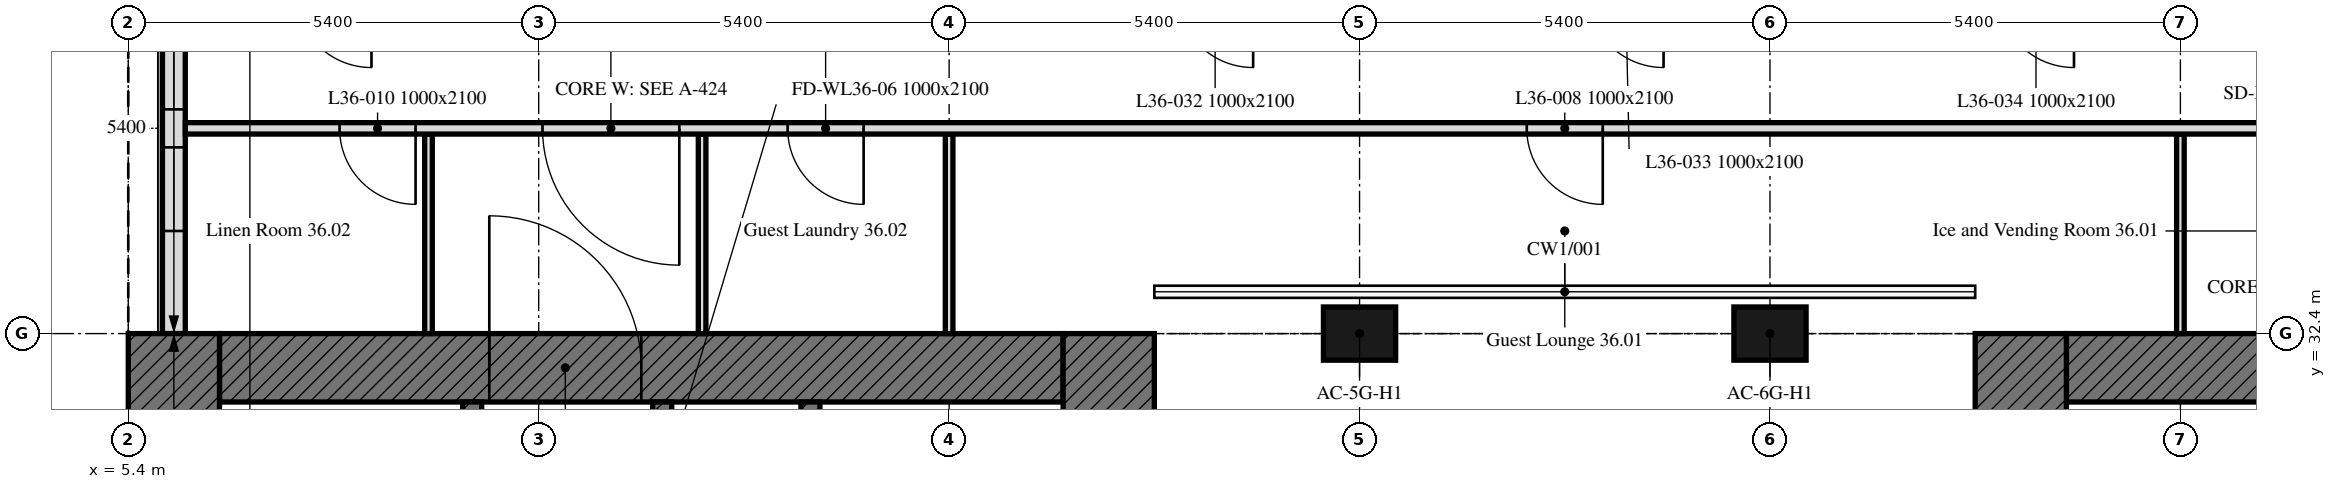
"""IFC4 building model, lengths in metres.
Left out: names, types, materials, properties, quantities, classifications, styles, units other than length and angle.
Written with IfcOpenShell. Run it as: python <this file> out.ifc"""

import sys

from ifc_helpers import new_model, si_unit, direction, frame, frame_2d, origin, origin_2d, place, context, subcontext, project, spatial, rectangle, extrude, element, fill, save


model = new_model("IFC4")
c1 = context("Model", 3, precision=1e-05, world=origin(), true_north=direction((0.0, 1.0)))
c2 = subcontext(c1, "Body", "Model", "MODEL_VIEW")
j1 = project(units=[si_unit("LENGTHUNIT", "METRE"), si_unit("PLANEANGLEUNIT", "RADIAN")], contexts=[c1])
p1 = place(None, origin())
s1 = spatial("IfcSite", under=j1, at=p1, CompositionType="ELEMENT")
p2 = place(p1, origin())
s2 = spatial("IfcBuilding", under=s1, at=p2, CompositionType="ELEMENT")
p3 = place(p2, frame((0.0, 0.0, 156.1)))
s3 = spatial("IfcBuildingStorey", under=s2, at=p3, CompositionType="ELEMENT", Elevation=156.1)
for number, where, z_axis, x_axis in (
    (1, (21.6, 32.4, 0.0), (0.0, 0.0, 1.0), (1.0, 0.0, 0.0)),
    (2, (27.0, 32.4, 0.0), (0.0, 0.0, 1.0), (1.0, 0.0, 0.0)),
):
    element("IfcColumn", number, at=place(p3, frame(where, z_axis=z_axis, x_axis=x_axis)), inside=s3, PredefinedType="COLUMN", context=c2, shape_type="SweptSolid", body=[
        extrude(rectangle(XDim=0.95, YDim=0.7, at=origin_2d()), origin(), (0.0, 0.0, 1.0), 3.0),
    ])
p4 = place(p3, frame((6.0, 37.614, 0.0), z_axis=(0.0, 0.0, 1.0), x_axis=(0.0, -1.0, 0.0)))
e3 = element("IfcWall", 3, at=p4, inside=s3, PredefinedType="SOLIDWALL", context=c2, shape_type="SweptSolid", body=[
    extrude(rectangle(XDim=5.214, YDim=0.3, at=frame_2d((2.607, 0.0))), origin(), (0.0, 0.0, 1.0), 3.0),
])
p5 = place(p4, frame((1.164, 0.0, 0.9)))
e4 = element("IfcOpeningElement", 4, at=p5, cuts=e3, PredefinedType="OPENING", context=c2, shape_type="SweptSolid", body=[
    extrude(rectangle(XDim=1.1, YDim=1.7, at=frame_2d((0.55, 0.85))), frame((0.0, 0.16, 0.0), z_axis=(0.0, -1.0, 0.0), x_axis=(1.0, 0.0, 0.0)), (0.0, 0.0, 1.0), 0.32),
])
p6 = place(p4, frame((2.764, 0.0, 0.9)))
e5 = element("IfcOpeningElement", 5, at=p6, cuts=e3, PredefinedType="OPENING", context=c2, shape_type="SweptSolid", body=[
    extrude(rectangle(XDim=1.1, YDim=1.7, at=frame_2d((0.55, 0.85))), frame((0.0, 0.16, 0.0), z_axis=(0.0, -1.0, 0.0), x_axis=(1.0, 0.0, 0.0)), (0.0, 0.0, 1.0), 0.32),
])
p7 = place(p3, frame((6.6, 31.95, 0.0), z_axis=(0.0, 0.0, 1.0), x_axis=(1.0, 0.0, 0.0)))
e6 = element("IfcWall", 6, at=p7, inside=s3, PredefinedType="SOLIDWALL", context=c2, shape_type="SweptSolid", body=[
    extrude(rectangle(XDim=11.1, YDim=0.9, at=frame_2d((5.55, 0.0))), origin(), (0.0, 0.0, 1.0), 3.0),
])
p8 = place(p7, frame((3.55, 0.0, 0.0)))
e7 = element("IfcOpeningElement", 7, at=p8, cuts=e6, PredefinedType="OPENING", context=c2, shape_type="SweptSolid", body=[
    extrude(rectangle(XDim=2.0, YDim=2.4, at=frame_2d((1.0, 1.2))), frame((0.0, 0.45, 0.0), z_axis=(0.0, -1.0, 0.0), x_axis=(1.0, 0.0, 0.0)), (0.0, 0.0, 1.0), 0.9),
])
for number, where, z_axis, x_axis in (
    (8, (6.0, 16.2, 0.0), (0.0, 0.0, 1.0), (0.0, 1.0, 0.0)),
    (9, (18.3, 32.4, 0.0), (0.0, 0.0, 1.0), (0.0, -1.0, 0.0)),
):
    element("IfcWall", number, at=place(p3, frame(where, z_axis=z_axis, x_axis=x_axis)), inside=s3, PredefinedType="SOLIDWALL", context=c2, shape_type="SweptSolid", body=[
        extrude(rectangle(XDim=16.2, YDim=1.2, at=frame_2d((8.1, 0.0))), origin(), (0.0, 0.0, 1.0), 3.0),
    ])
p9 = place(p3, frame((9.925, 17.1, 0.0), z_axis=(0.0, 0.0, 1.0), x_axis=(0.0, 1.0, 0.0)))
e10 = element("IfcWall", 10, at=p9, inside=s3, PredefinedType="SOLIDWALL", context=c2, shape_type="SweptSolid", body=[
    extrude(rectangle(XDim=14.4, YDim=0.25, at=frame_2d((7.2, 0.0))), origin(), (0.0, 0.0, 1.0), 3.0),
])
p10 = place(p9, frame((4.6, 0.0, 0.0)))
e11 = element("IfcOpeningElement", 11, at=p10, cuts=e10, PredefinedType="OPENING", context=c2, shape_type="SweptSolid", body=[
    extrude(rectangle(XDim=1.0, YDim=2.1, at=frame_2d((0.5, 1.05))), frame((0.0, 0.125, 0.0), z_axis=(0.0, -1.0, 0.0), x_axis=(1.0, 0.0, 0.0)), (0.0, 0.0, 1.0), 0.25),
])
p11 = place(p9, frame((7.062, 0.0, 0.0)))
e12 = element("IfcOpeningElement", 12, at=p11, cuts=e10, PredefinedType="OPENING", context=c2, shape_type="SweptSolid", body=[
    extrude(rectangle(XDim=1.2, YDim=2.1, at=frame_2d((0.6, 1.05))), frame((0.0, 0.125, 0.0), z_axis=(0.0, -1.0, 0.0), x_axis=(1.0, 0.0, 0.0)), (0.0, 0.0, 1.0), 0.25),
])
p12 = place(p9, frame((9.472, 0.0, 0.0)))
e13 = element("IfcOpeningElement", 13, at=p12, cuts=e10, PredefinedType="OPENING", context=c2, shape_type="SweptSolid", body=[
    extrude(rectangle(XDim=0.9, YDim=2.1, at=frame_2d((0.45, 1.05))), frame((0.0, 0.125, 0.0), z_axis=(0.0, -1.0, 0.0), x_axis=(1.0, 0.0, 0.0)), (0.0, 0.0, 1.0), 0.25),
])
p13 = place(p9, frame((11.159, 0.0, 0.0)))
e14 = element("IfcOpeningElement", 14, at=p13, cuts=e10, PredefinedType="OPENING", context=c2, shape_type="SweptSolid", body=[
    extrude(rectangle(XDim=0.9, YDim=2.1, at=frame_2d((0.45, 1.05))), frame((0.0, 0.125, 0.0), z_axis=(0.0, -1.0, 0.0), x_axis=(1.0, 0.0, 0.0)), (0.0, 0.0, 1.0), 0.25),
])
p14 = place(p9, frame((13.1, 0.0, 0.0)))
e15 = element("IfcOpeningElement", 15, at=p14, cuts=e10, PredefinedType="OPENING", context=c2, shape_type="SweptSolid", body=[
    extrude(rectangle(XDim=0.9, YDim=2.1, at=frame_2d((0.45, 1.05))), frame((0.0, 0.125, 0.0), z_axis=(0.0, -1.0, 0.0), x_axis=(1.0, 0.0, 0.0)), (0.0, 0.0, 1.0), 0.25),
])
p15 = place(p3, frame((14.375, 17.1, 0.0), z_axis=(0.0, 0.0, 1.0), x_axis=(0.0, 1.0, 0.0)))
e16 = element("IfcWall", 16, at=p15, inside=s3, PredefinedType="SOLIDWALL", context=c2, shape_type="SweptSolid", body=[
    extrude(rectangle(XDim=14.4, YDim=0.25, at=frame_2d((7.2, 0.0))), origin(), (0.0, 0.0, 1.0), 3.0),
])
p16 = place(p15, frame((13.15, 0.0, 0.0)))
e17 = element("IfcOpeningElement", 17, at=p16, cuts=e16, PredefinedType="OPENING", context=c2, shape_type="SweptSolid", body=[
    extrude(rectangle(XDim=1.0, YDim=2.1, at=frame_2d((0.5, 1.05))), frame((0.0, 0.125, 0.0), z_axis=(0.0, -1.0, 0.0), x_axis=(1.0, 0.0, 0.0)), (0.0, 0.0, 1.0), 0.25),
])
p17 = place(p15, frame((0.6, 0.0, 0.0)))
e18 = element("IfcOpeningElement", 18, at=p17, cuts=e16, PredefinedType="OPENING", context=c2, shape_type="SweptSolid", body=[
    extrude(rectangle(XDim=1.1, YDim=2.1, at=frame_2d((0.55, 1.05))), frame((0.0, 0.125, 0.0), z_axis=(0.0, -1.0, 0.0), x_axis=(1.0, 0.0, 0.0)), (0.0, 0.0, 1.0), 0.25),
])
p18 = place(p15, frame((3.25, 0.0, 0.0)))
e19 = element("IfcOpeningElement", 19, at=p18, cuts=e16, PredefinedType="OPENING", context=c2, shape_type="SweptSolid", body=[
    extrude(rectangle(XDim=0.9, YDim=2.1, at=frame_2d((0.45, 1.05))), frame((0.0, 0.125, 0.0), z_axis=(0.0, -1.0, 0.0), x_axis=(1.0, 0.0, 0.0)), (0.0, 0.0, 1.0), 0.25),
])
p19 = place(p3, frame((12.425, 29.4, 0.0), z_axis=(0.0, 0.0, 1.0), x_axis=(0.0, 1.0, 0.0)))
e20 = element("IfcWall", 20, at=p19, inside=s3, PredefinedType="SOLIDWALL", context=c2, shape_type="SweptSolid", body=[
    extrude(rectangle(XDim=2.1, YDim=0.25, at=frame_2d((1.05, 0.0))), origin(), (0.0, 0.0, 1.0), 3.0),
])
p20 = place(p19, frame((0.5, 0.0, 0.0)))
e21 = element("IfcOpeningElement", 21, at=p20, cuts=e20, PredefinedType="OPENING", context=c2, shape_type="SweptSolid", body=[
    extrude(rectangle(XDim=1.0, YDim=2.1, at=frame_2d((0.5, 1.05))), frame((0.0, 0.125, 0.0), z_axis=(0.0, -1.0, 0.0), x_axis=(1.0, 0.0, 0.0)), (0.0, 0.0, 1.0), 0.25),
])
p21 = place(p3, frame((30.9, 31.95, 0.0), z_axis=(0.0, 0.0, 1.0), x_axis=(1.0, 0.0, 0.0)))
e22 = element("IfcWall", 22, at=p21, inside=s3, PredefinedType="SOLIDWALL", context=c2, shape_type="SweptSolid", body=[
    extrude(rectangle(XDim=11.1, YDim=0.9, at=frame_2d((5.55, 0.0))), origin(), (0.0, 0.0, 1.0), 3.0),
])
p22 = place(p21, frame((5.55, 0.0, 0.0)))
e23 = element("IfcOpeningElement", 23, at=p22, cuts=e22, PredefinedType="OPENING", context=c2, shape_type="SweptSolid", body=[
    extrude(rectangle(XDim=2.0, YDim=2.4, at=frame_2d((1.0, 1.2))), frame((0.0, 0.45, 0.0), z_axis=(0.0, -1.0, 0.0), x_axis=(1.0, 0.0, 0.0)), (0.0, 0.0, 1.0), 0.9),
])
p23 = place(p3, frame((30.3, 16.2, 0.0), z_axis=(0.0, 0.0, 1.0), x_axis=(0.0, 1.0, 0.0)))
e24 = element("IfcWall", 24, at=p23, inside=s3, PredefinedType="SOLIDWALL", context=c2, shape_type="SweptSolid", body=[
    extrude(rectangle(XDim=16.2, YDim=1.2, at=frame_2d((8.1, 0.0))), origin(), (0.0, 0.0, 1.0), 3.0),
])
for number, where, z_axis, x_axis in (
    (25, (16.2, 35.025, 0.0), (0.0, 0.0, 1.0), (0.0, -1.0, 0.0)),
    (26, (32.4, 32.4, 0.0), (0.0, 0.0, 1.0), (0.0, 1.0, 0.0)),
    (27, (9.35, 35.025, 0.0), (0.0, 0.0, 1.0), (0.0, -1.0, 0.0)),
    (28, (12.95, 32.4, 0.0), (0.0, 0.0, 1.0), (0.0, 1.0, 0.0)),
):
    element("IfcWall", number, at=place(p3, frame(where, z_axis=z_axis, x_axis=x_axis)), inside=s3, PredefinedType="PARTITIONING", context=c2, shape_type="SweptSolid", body=[
        extrude(rectangle(XDim=2.625, YDim=0.1, at=frame_2d((1.312, 0.0))), origin(), (0.0, 0.0, 1.0), 3.0),
    ])
p24 = place(p3, frame((43.275, 35.1, 0.0), z_axis=(0.0, 0.0, 1.0), x_axis=(-1.0, 0.0, 0.0)))
e29 = element("IfcWall", 29, at=p24, inside=s3, PredefinedType="PARTITIONING", context=c2, shape_type="SweptSolid", body=[
    extrude(rectangle(XDim=37.124, YDim=0.15, at=frame_2d((18.562, 0.0))), origin(), (0.0, 0.0, 1.0), 3.0),
])
p25 = place(p24, frame((18.475, 0.0, 0.0)))
e30 = element("IfcOpeningElement", 30, at=p25, cuts=e29, PredefinedType="OPENING", context=c2, shape_type="SweptSolid", body=[
    extrude(rectangle(XDim=1.0, YDim=2.1, at=frame_2d((0.5, 1.05))), frame((0.0, 0.075, 0.0), z_axis=(0.0, -1.0, 0.0), x_axis=(1.0, 0.0, 0.0)), (0.0, 0.0, 1.0), 0.15),
])
p26 = place(p24, frame((34.095, 0.0, 0.0)))
e31 = element("IfcOpeningElement", 31, at=p26, cuts=e29, PredefinedType="OPENING", context=c2, shape_type="SweptSolid", body=[
    extrude(rectangle(XDim=1.0, YDim=2.1, at=frame_2d((0.5, 1.05))), frame((0.0, 0.075, 0.0), z_axis=(0.0, -1.0, 0.0), x_axis=(1.0, 0.0, 0.0)), (0.0, 0.0, 1.0), 0.15),
])
p27 = place(p24, frame((8.75, 0.0, 0.0)))
e32 = element("IfcOpeningElement", 32, at=p27, cuts=e29, PredefinedType="OPENING", context=c2, shape_type="SweptSolid", body=[
    extrude(rectangle(XDim=1.0, YDim=2.1, at=frame_2d((0.5, 1.05))), frame((0.0, 0.075, 0.0), z_axis=(0.0, -1.0, 0.0), x_axis=(1.0, 0.0, 0.0)), (0.0, 0.0, 1.0), 0.15),
])
p28 = place(p24, frame((1.55, 0.0, 0.0)))
e33 = element("IfcOpeningElement", 33, at=p28, cuts=e29, PredefinedType="OPENING", context=c2, shape_type="SweptSolid", body=[
    extrude(rectangle(XDim=1.0, YDim=2.1, at=frame_2d((0.5, 1.05))), frame((0.0, 0.075, 0.0), z_axis=(0.0, -1.0, 0.0), x_axis=(1.0, 0.0, 0.0)), (0.0, 0.0, 1.0), 0.15),
])
p29 = place(p24, frame((28.2, 0.0, 0.0)))
e34 = element("IfcOpeningElement", 34, at=p29, cuts=e29, PredefinedType="OPENING", context=c2, shape_type="SweptSolid", body=[
    extrude(rectangle(XDim=1.0, YDim=2.1, at=frame_2d((0.5, 1.05))), frame((0.0, 0.075, 0.0), z_axis=(0.0, -1.0, 0.0), x_axis=(1.0, 0.0, 0.0)), (0.0, 0.0, 1.0), 0.15),
])
p30 = place(p24, frame((30.625, 0.0, 0.0)))
e35 = element("IfcOpeningElement", 35, at=p30, cuts=e29, PredefinedType="OPENING", context=c2, shape_type="SweptSolid", body=[
    extrude(rectangle(XDim=1.8, YDim=2.4, at=frame_2d((0.9, 1.2))), frame((0.0, 0.075, 0.0), z_axis=(0.0, -1.0, 0.0), x_axis=(1.0, 0.0, 0.0)), (0.0, 0.0, 1.0), 0.15),
])
p31 = place(p24, frame((5.525, 0.0, 0.0)))
e36 = element("IfcOpeningElement", 36, at=p31, cuts=e29, PredefinedType="OPENING", context=c2, shape_type="SweptSolid", body=[
    extrude(rectangle(XDim=1.8, YDim=2.4, at=frame_2d((0.9, 1.2))), frame((0.0, 0.075, 0.0), z_axis=(0.0, -1.0, 0.0), x_axis=(1.0, 0.0, 0.0)), (0.0, 0.0, 1.0), 0.15),
])
p32 = place(p5, origin())
e37 = element("IfcWindow", 37, at=p32, inside=s3, PartitioningType="SINGLE_PANEL", PredefinedType="WINDOW", context=c2, shape_type="SweptSolid", body=[
    extrude(rectangle(XDim=1.1, YDim=1.7, at=frame_2d((0.55, 0.85))), frame((0.0, 0.03, 0.0), z_axis=(0.0, -1.0, 0.0), x_axis=(1.0, 0.0, 0.0)), (0.0, 0.0, 1.0), 0.06),
])
fill(e4, e37)
p33 = place(p6, origin())
e38 = element("IfcWindow", 38, at=p33, inside=s3, PartitioningType="SINGLE_PANEL", PredefinedType="WINDOW", context=c2, shape_type="SweptSolid", body=[
    extrude(rectangle(XDim=1.1, YDim=1.7, at=frame_2d((0.55, 0.85))), frame((0.0, 0.03, 0.0), z_axis=(0.0, -1.0, 0.0), x_axis=(1.0, 0.0, 0.0)), (0.0, 0.0, 1.0), 0.06),
])
fill(e5, e38)
p34 = place(p8, origin())
e39 = element("IfcDoor", 39, at=p34, inside=s3, OperationType="DOUBLE_DOOR_SINGLE_SWING", PredefinedType="DOOR", context=c2, shape_type="SweptSolid", body=[
    extrude(rectangle(XDim=2.0, YDim=2.4, at=frame_2d((1.0, 1.2))), frame((0.0, 0.025, 0.0), z_axis=(0.0, -1.0, 0.0), x_axis=(1.0, 0.0, 0.0)), (0.0, 0.0, 1.0), 0.05),
])
fill(e7, e39)
p35 = place(p25, origin())
e40 = element("IfcDoor", 40, at=p35, inside=s3, OperationType="SINGLE_SWING_LEFT", PredefinedType="DOOR", context=c2, shape_type="SweptSolid", body=[
    extrude(rectangle(XDim=1.0, YDim=2.1, at=frame_2d((0.5, 1.05))), frame((0.0, 0.025, 0.0), z_axis=(0.0, -1.0, 0.0), x_axis=(1.0, 0.0, 0.0)), (0.0, 0.0, 1.0), 0.05),
])
fill(e30, e40)
p36 = place(p26, origin())
e41 = element("IfcDoor", 41, at=p36, inside=s3, OperationType="SINGLE_SWING_RIGHT", PredefinedType="DOOR", context=c2, shape_type="SweptSolid", body=[
    extrude(rectangle(XDim=1.0, YDim=2.1, at=frame_2d((0.5, 1.05))), frame((0.0, 0.025, 0.0), z_axis=(0.0, -1.0, 0.0), x_axis=(1.0, 0.0, 0.0)), (0.0, 0.0, 1.0), 0.05),
])
fill(e31, e41)
p37 = place(p29, origin())
e42 = element("IfcDoor", 42, at=p37, inside=s3, OperationType="SINGLE_SWING_LEFT", PredefinedType="DOOR", context=c2, shape_type="SweptSolid", body=[
    extrude(rectangle(XDim=1.0, YDim=2.1, at=frame_2d((0.5, 1.05))), frame((0.0, 0.025, 0.0), z_axis=(0.0, -1.0, 0.0), x_axis=(1.0, 0.0, 0.0)), (0.0, 0.0, 1.0), 0.05),
])
fill(e34, e42)
p38 = place(p30, origin())
e43 = element("IfcDoor", 43, at=p38, inside=s3, OperationType="DOUBLE_DOOR_SINGLE_SWING", PredefinedType="DOOR", context=c2, shape_type="SweptSolid", body=[
    extrude(rectangle(XDim=1.8, YDim=2.4, at=frame_2d((0.9, 1.2))), frame((0.0, 0.025, 0.0), z_axis=(0.0, -1.0, 0.0), x_axis=(1.0, 0.0, 0.0)), (0.0, 0.0, 1.0), 0.05),
])
fill(e35, e43)
save(model, sys.argv[1])
